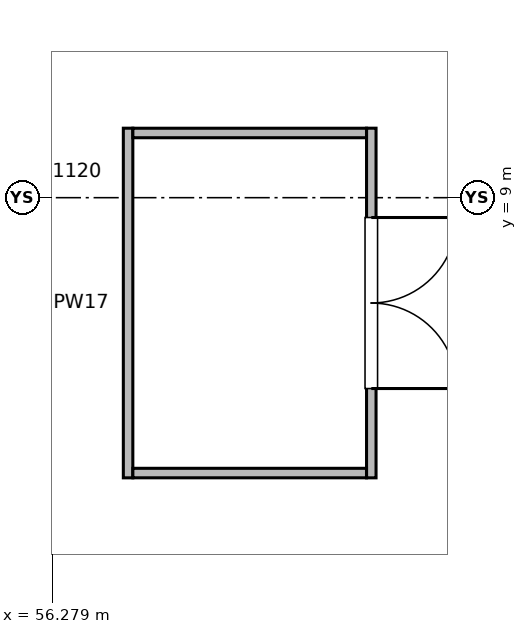
"""IFC4 building model, lengths in metres.
Left out: names, types, materials, properties, quantities, classifications, styles, units other than length and angle.
Written with IfcOpenShell. Run it as: python <this file> out.ifc"""

import sys

from ifc_helpers import new_model, si_unit, direction, frame, frame_2d, origin, place, context, subcontext, project, spatial, rectangle, extrude, element, fill, save


model = new_model("IFC4")
c1 = context("Model", 3, precision=1e-05, world=origin(), true_north=direction((0.0, 1.0)))
c2 = subcontext(c1, "Body", "Model", "MODEL_VIEW")
j1 = project(units=[si_unit("LENGTHUNIT", "METRE"), si_unit("PLANEANGLEUNIT", "RADIAN")], contexts=[c1])
p1 = place(None, origin())
s1 = spatial("IfcSite", under=j1, at=p1, CompositionType="ELEMENT")
p2 = place(p1, origin())
s2 = spatial("IfcBuilding", under=s1, at=p2, CompositionType="ELEMENT")
p3 = place(p2, frame((0.0, 0.0, 6.0)))
s3 = spatial("IfcBuildingStorey", under=s2, at=p3, CompositionType="ELEMENT", Elevation=6.0)
p4 = place(p3, frame((60.478, 9.914, 0.0), z_axis=(0.0, 0.0, 1.0), x_axis=(0.0, -1.0, 0.0)))
e1 = element("IfcWall", 1, at=p4, inside=s3, PredefinedType="PARTITIONING", context=c2, shape_type="SweptSolid", body=[
    extrude(rectangle(XDim=4.6, YDim=0.125, at=frame_2d((2.3, 0.0))), origin(), (0.0, 0.0, 1.0), 4.42),
])
p5 = place(p4, frame((1.175, 0.0, 0.0)))
e2 = element("IfcOpeningElement", 2, at=p5, cuts=e1, PredefinedType="OPENING", context=c2, shape_type="SweptSolid", body=[
    extrude(rectangle(XDim=2.25, YDim=2.45, at=frame_2d((1.125, 1.225))), frame((0.0, 0.073, 0.0), z_axis=(0.0, -1.0, 0.0), x_axis=(1.0, 0.0, 0.0)), (0.0, 0.0, 1.0), 0.145),
])
p6 = place(p3, frame((57.278, 5.314, 0.0), z_axis=(0.0, 0.0, 1.0), x_axis=(0.0, 1.0, 0.0)))
e3 = element("IfcWall", 3, at=p6, inside=s3, PredefinedType="PARTITIONING", context=c2, shape_type="SweptSolid", body=[
    extrude(rectangle(XDim=4.6, YDim=0.125, at=frame_2d((2.3, 0.0))), origin(), (0.0, 0.0, 1.0), 4.42),
])
for number, where, z_axis, x_axis in (
    (4, (57.341, 5.377, 0.0), (0.0, 0.0, 1.0), (1.0, 0.0, 0.0)),
    (5, (57.341, 9.851, 0.0), (0.0, 0.0, 1.0), (1.0, 0.0, 0.0)),
):
    element("IfcWall", number, at=place(p3, frame(where, z_axis=z_axis, x_axis=x_axis)), inside=s3, PredefinedType="PARTITIONING", context=c2, shape_type="SweptSolid", body=[
        extrude(rectangle(XDim=3.074, YDim=0.125, at=frame_2d((1.537, 0.0))), origin(), (0.0, 0.0, 1.0), 4.42),
    ])
p7 = place(p5, origin())
e6 = element("IfcDoor", 6, at=p7, inside=s3, OperationType="DOUBLE_DOOR_SINGLE_SWING", PredefinedType="DOOR", context=c2, shape_type="SweptSolid", body=[
    extrude(rectangle(XDim=2.25, YDim=2.45, at=frame_2d((1.125, 1.225))), frame((0.0, 0.025, 0.0), z_axis=(0.0, -1.0, 0.0), x_axis=(1.0, 0.0, 0.0)), (0.0, 0.0, 1.0), 0.05),
])
fill(e2, e6)
save(model, sys.argv[1])
